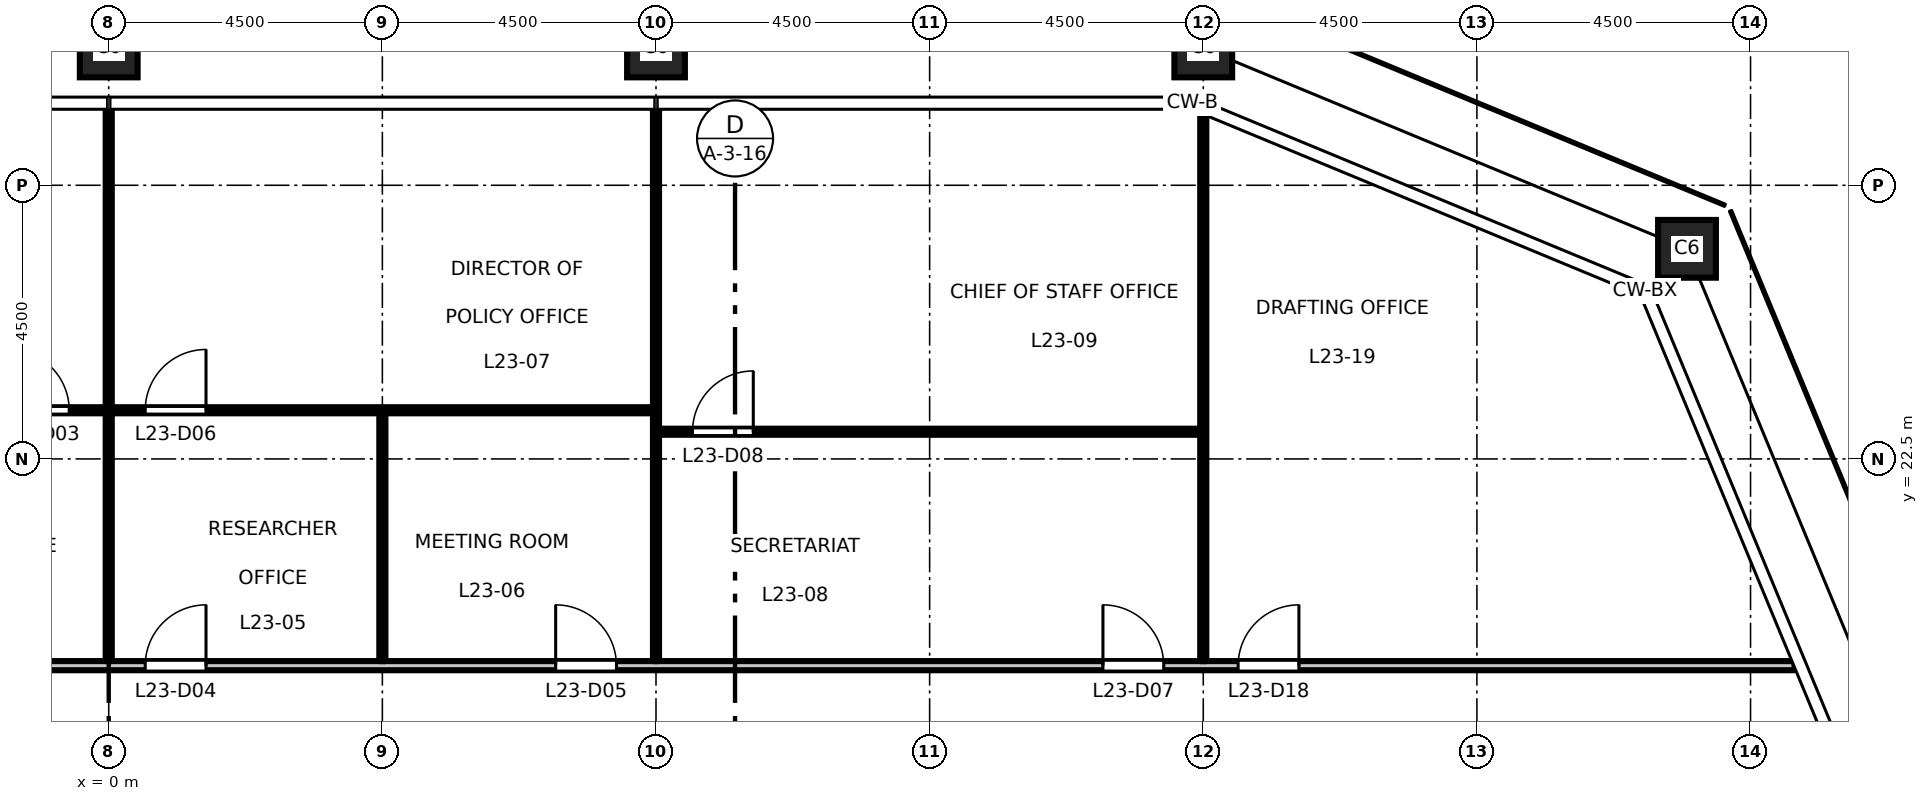
"""IFC4 building model, lengths in metres.
Left out: names, types, materials, properties, quantities, classifications, styles, units other than length and angle.
Written with IfcOpenShell. Run it as: python <this file> out.ifc"""

import sys

from ifc_helpers import new_model, si_unit, direction, frame, frame_2d, origin, origin_2d, place, context, subcontext, project, spatial, rectangle, hollow_rectangle, extrude, element, fill, save


model = new_model("IFC4")
c1 = context("Model", 3, precision=1e-05, world=origin(), true_north=direction((0.0, 1.0)))
c2 = subcontext(c1, "Body", "Model", "MODEL_VIEW")
j1 = project(units=[si_unit("LENGTHUNIT", "METRE"), si_unit("PLANEANGLEUNIT", "RADIAN")], contexts=[c1])
p1 = place(None, origin())
s1 = spatial("IfcSite", under=j1, at=p1, CompositionType="ELEMENT")
p2 = place(p1, origin())
s2 = spatial("IfcBuilding", under=s1, at=p2, CompositionType="ELEMENT")
p3 = place(p2, frame((0.0, 0.0, 109.2)))
s3 = spatial("IfcBuildingStorey", under=s2, at=p3, CompositionType="ELEMENT", Elevation=109.2)
for number, where, z_axis, x_axis in (
    (1, (25.955, 25.955, 0.0), (0.0, 0.0, 1.0), (1.0, 0.0, 0.0)),
    (2, (18.0, 29.25, 0.0), (0.0, 0.0, 1.0), (1.0, 0.0, 0.0)),
    (3, (9.0, 29.25, 0.0), (0.0, 0.0, 1.0), (1.0, 0.0, 0.0)),
    (4, (0.0, 29.25, 0.0), (0.0, 0.0, 1.0), (1.0, 0.0, 0.0)),
):
    element("IfcColumn", number, at=place(p3, frame(where, z_axis=z_axis, x_axis=x_axis)), inside=s3, PredefinedType="COLUMN", context=c2, shape_type="SweptSolid", body=[
        extrude(hollow_rectangle(XDim=0.95, YDim=0.95, WallThickness=0.055, at=origin_2d()), origin(), (0.0, 0.0, 1.0), 4.5),
    ])
p4 = place(p3, frame((-27.723, 19.1, 0.0), z_axis=(0.0, 0.0, 1.0), x_axis=(1.0, 0.0, 0.0)))
e5 = element("IfcWall", 5, at=p4, inside=s3, PredefinedType="PARTITIONING", context=c2, shape_type="SweptSolid", body=[
    extrude(rectangle(XDim=55.446, YDim=0.15, at=frame_2d((27.723, 0.0))), origin(), (0.0, 0.0, 1.0), 4.35),
])
p5 = place(p4, frame((17.073, 0.0, 0.0)))
e6 = element("IfcOpeningElement", 6, at=p5, cuts=e5, PredefinedType="OPENING", context=c2, shape_type="SweptSolid", body=[
    extrude(rectangle(XDim=1.0, YDim=2.1, at=frame_2d((0.5, 1.05))), frame((0.0, 0.085, 0.0), z_axis=(0.0, -1.0, 0.0), x_axis=(1.0, 0.0, 0.0)), (0.0, 0.0, 1.0), 0.17),
])
p6 = place(p4, frame((19.323, 0.0, 0.0)))
e7 = element("IfcOpeningElement", 7, at=p6, cuts=e5, PredefinedType="OPENING", context=c2, shape_type="SweptSolid", body=[
    extrude(rectangle(XDim=1.0, YDim=2.1, at=frame_2d((0.5, 1.05))), frame((0.0, 0.085, 0.0), z_axis=(0.0, -1.0, 0.0), x_axis=(1.0, 0.0, 0.0)), (0.0, 0.0, 1.0), 0.17),
])
p7 = place(p4, frame((28.323, 0.0, 0.0)))
e8 = element("IfcOpeningElement", 8, at=p7, cuts=e5, PredefinedType="OPENING", context=c2, shape_type="SweptSolid", body=[
    extrude(rectangle(XDim=1.0, YDim=2.1, at=frame_2d((0.5, 1.05))), frame((0.0, 0.085, 0.0), z_axis=(0.0, -1.0, 0.0), x_axis=(1.0, 0.0, 0.0)), (0.0, 0.0, 1.0), 0.17),
])
p8 = place(p4, frame((35.073, 0.0, 0.0)))
e9 = element("IfcOpeningElement", 9, at=p8, cuts=e5, PredefinedType="OPENING", context=c2, shape_type="SweptSolid", body=[
    extrude(rectangle(XDim=1.0, YDim=2.1, at=frame_2d((0.5, 1.05))), frame((0.0, 0.085, 0.0), z_axis=(0.0, -1.0, 0.0), x_axis=(1.0, 0.0, 0.0)), (0.0, 0.0, 1.0), 0.17),
])
p9 = place(p4, frame((44.073, 0.0, 0.0)))
e10 = element("IfcOpeningElement", 10, at=p9, cuts=e5, PredefinedType="OPENING", context=c2, shape_type="SweptSolid", body=[
    extrude(rectangle(XDim=1.0, YDim=2.1, at=frame_2d((0.5, 1.05))), frame((0.0, 0.085, 0.0), z_axis=(0.0, -1.0, 0.0), x_axis=(1.0, 0.0, 0.0)), (0.0, 0.0, 1.0), 0.17),
])
p10 = place(p4, frame((0.573, 0.0, 0.0)))
e11 = element("IfcOpeningElement", 11, at=p10, cuts=e5, PredefinedType="OPENING", context=c2, shape_type="SweptSolid", body=[
    extrude(rectangle(XDim=1.0, YDim=2.1, at=frame_2d((0.5, 1.05))), frame((0.0, 0.085, 0.0), z_axis=(0.0, -1.0, 0.0), x_axis=(1.0, 0.0, 0.0)), (0.0, 0.0, 1.0), 0.17),
])
p11 = place(p4, frame((46.296, 0.0, 0.0)))
e12 = element("IfcOpeningElement", 12, at=p11, cuts=e5, PredefinedType="OPENING", context=c2, shape_type="SweptSolid", body=[
    extrude(rectangle(XDim=1.0, YDim=2.1, at=frame_2d((0.5, 1.05))), frame((0.0, 0.085, 0.0), z_axis=(0.0, -1.0, 0.0), x_axis=(1.0, 0.0, 0.0)), (0.0, 0.0, 1.0), 0.17),
])
p12 = place(p3, frame((9.05, 22.947, 0.0), z_axis=(0.0, 0.0, 1.0), x_axis=(1.0, 0.0, 0.0)))
e13 = element("IfcWall", 13, at=p12, inside=s3, PredefinedType="PARTITIONING", context=c2, shape_type="SweptSolid", body=[
    extrude(rectangle(XDim=8.9, YDim=0.1, at=frame_2d((4.45, 0.0))), origin(), (0.0, 0.0, 1.0), 4.35),
])
p13 = place(p12, frame((0.55, 0.0, 0.0)))
e14 = element("IfcOpeningElement", 14, at=p13, cuts=e13, PredefinedType="OPENING", context=c2, shape_type="SweptSolid", body=[
    extrude(rectangle(XDim=1.0, YDim=2.1, at=frame_2d((0.5, 1.05))), frame((0.0, 0.06, 0.0), z_axis=(0.0, -1.0, 0.0), x_axis=(1.0, 0.0, 0.0)), (0.0, 0.0, 1.0), 0.12),
])
p14 = place(p3, frame((-8.95, 23.3, 0.0), z_axis=(0.0, 0.0, 1.0), x_axis=(1.0, 0.0, 0.0)))
e15 = element("IfcWall", 15, at=p14, inside=s3, PredefinedType="PARTITIONING", context=c2, shape_type="SweptSolid", body=[
    extrude(rectangle(XDim=17.9, YDim=0.1, at=frame_2d((8.95, 0.0))), origin(), (0.0, 0.0, 1.0), 4.35),
])
p15 = place(p14, frame((7.3, 0.0, 0.0)))
e16 = element("IfcOpeningElement", 16, at=p15, cuts=e15, PredefinedType="OPENING", context=c2, shape_type="SweptSolid", body=[
    extrude(rectangle(XDim=1.0, YDim=2.1, at=frame_2d((0.5, 1.05))), frame((0.0, 0.06, 0.0), z_axis=(0.0, -1.0, 0.0), x_axis=(1.0, 0.0, 0.0)), (0.0, 0.0, 1.0), 0.12),
])
p16 = place(p14, frame((9.55, 0.0, 0.0)))
e17 = element("IfcOpeningElement", 17, at=p16, cuts=e15, PredefinedType="OPENING", context=c2, shape_type="SweptSolid", body=[
    extrude(rectangle(XDim=1.0, YDim=2.1, at=frame_2d((0.5, 1.05))), frame((0.0, 0.06, 0.0), z_axis=(0.0, -1.0, 0.0), x_axis=(1.0, 0.0, 0.0)), (0.0, 0.0, 1.0), 0.12),
])
p17 = place(p3, frame((0.0, 19.175, 0.0), z_axis=(0.0, 0.0, 1.0), x_axis=(0.0, 1.0, 0.0)))
e18 = element("IfcWall", 18, at=p17, inside=s3, PredefinedType="PARTITIONING", context=c2, shape_type="SweptSolid", body=[
    extrude(rectangle(XDim=4.075, YDim=0.1, at=frame_2d((2.038, 0.0))), origin(), (0.0, 0.0, 1.0), 3.45),
])
p18 = place(p3, frame((0.0, 23.35, 0.0), z_axis=(0.0, 0.0, 1.0), x_axis=(0.0, 1.0, 0.0)))
e19 = element("IfcWall", 19, at=p18, inside=s3, PredefinedType="PARTITIONING", context=c2, shape_type="SweptSolid", body=[
    extrude(rectangle(XDim=4.91, YDim=0.1, at=frame_2d((2.455, 0.0))), origin(), (0.0, 0.0, 1.0), 3.45),
])
p19 = place(p3, frame((4.5, 19.175, 0.0), z_axis=(0.0, 0.0, 1.0), x_axis=(0.0, 1.0, 0.0)))
e20 = element("IfcWall", 20, at=p19, inside=s3, PredefinedType="PARTITIONING", context=c2, shape_type="SweptSolid", body=[
    extrude(rectangle(XDim=4.075, YDim=0.1, at=frame_2d((2.038, 0.0))), origin(), (0.0, 0.0, 1.0), 4.35),
])
p20 = place(p3, frame((9.0, 19.175, 0.0), z_axis=(0.0, 0.0, 1.0), x_axis=(0.0, 1.0, 0.0)))
e21 = element("IfcWall", 21, at=p20, inside=s3, PredefinedType="PARTITIONING", context=c2, shape_type="SweptSolid", body=[
    extrude(rectangle(XDim=9.085, YDim=0.1, at=frame_2d((4.542, 0.0))), origin(), (0.0, 0.0, 1.0), 3.45),
])
p21 = place(p3, frame((18.0, 19.175, 0.0), z_axis=(0.0, 0.0, 1.0), x_axis=(0.0, 1.0, 0.0)))
e22 = element("IfcWall", 22, at=p21, inside=s3, PredefinedType="PARTITIONING", context=c2, shape_type="SweptSolid", body=[
    extrude(rectangle(XDim=9.003, YDim=0.1, at=frame_2d((4.501, 0.0))), origin(), (0.0, 0.0, 1.0), 3.45),
])
p22 = place(p15, origin())
e23 = element("IfcDoor", 23, at=p22, inside=s3, OperationType="SINGLE_SWING_LEFT", PredefinedType="DOOR", context=c2, shape_type="SweptSolid", body=[
    extrude(rectangle(XDim=1.0, YDim=2.1, at=frame_2d((0.5, 1.05))), frame((0.0, 0.025, 0.0), z_axis=(0.0, -1.0, 0.0), x_axis=(1.0, 0.0, 0.0)), (0.0, 0.0, 1.0), 0.05),
])
fill(e16, e23)
p23 = place(p7, origin())
e24 = element("IfcDoor", 24, at=p23, inside=s3, OperationType="SINGLE_SWING_RIGHT", PredefinedType="DOOR", context=c2, shape_type="SweptSolid", body=[
    extrude(rectangle(XDim=1.0, YDim=2.1, at=frame_2d((0.5, 1.05))), frame((0.0, 0.025, 0.0), z_axis=(0.0, -1.0, 0.0), x_axis=(1.0, 0.0, 0.0)), (0.0, 0.0, 1.0), 0.05),
])
fill(e8, e24)
p24 = place(p8, origin())
e25 = element("IfcDoor", 25, at=p24, inside=s3, OperationType="SINGLE_SWING_LEFT", PredefinedType="DOOR", context=c2, shape_type="SweptSolid", body=[
    extrude(rectangle(XDim=1.0, YDim=2.1, at=frame_2d((0.5, 1.05))), frame((0.0, 0.025, 0.0), z_axis=(0.0, -1.0, 0.0), x_axis=(1.0, 0.0, 0.0)), (0.0, 0.0, 1.0), 0.05),
])
fill(e9, e25)
p25 = place(p16, origin())
e26 = element("IfcDoor", 26, at=p25, inside=s3, OperationType="SINGLE_SWING_RIGHT", PredefinedType="DOOR", context=c2, shape_type="SweptSolid", body=[
    extrude(rectangle(XDim=1.0, YDim=2.1, at=frame_2d((0.5, 1.05))), frame((0.0, 0.025, 0.0), z_axis=(0.0, -1.0, 0.0), x_axis=(1.0, 0.0, 0.0)), (0.0, 0.0, 1.0), 0.05),
])
fill(e17, e26)
p26 = place(p9, origin())
e27 = element("IfcDoor", 27, at=p26, inside=s3, OperationType="SINGLE_SWING_LEFT", PredefinedType="DOOR", context=c2, shape_type="SweptSolid", body=[
    extrude(rectangle(XDim=1.0, YDim=2.1, at=frame_2d((0.5, 1.05))), frame((0.0, 0.025, 0.0), z_axis=(0.0, -1.0, 0.0), x_axis=(1.0, 0.0, 0.0)), (0.0, 0.0, 1.0), 0.05),
])
fill(e10, e27)
p27 = place(p13, origin())
e28 = element("IfcDoor", 28, at=p27, inside=s3, OperationType="SINGLE_SWING_RIGHT", PredefinedType="DOOR", context=c2, shape_type="SweptSolid", body=[
    extrude(rectangle(XDim=1.0, YDim=2.1, at=frame_2d((0.5, 1.05))), frame((0.0, 0.025, 0.0), z_axis=(0.0, -1.0, 0.0), x_axis=(1.0, 0.0, 0.0)), (0.0, 0.0, 1.0), 0.05),
])
fill(e14, e28)
p28 = place(p11, origin())
e29 = element("IfcDoor", 29, at=p28, inside=s3, OperationType="SINGLE_SWING_RIGHT", PredefinedType="DOOR", context=c2, shape_type="SweptSolid", body=[
    extrude(rectangle(XDim=1.0, YDim=2.1, at=frame_2d((0.5, 1.05))), frame((0.0, 0.025, 0.0), z_axis=(0.0, -1.0, 0.0), x_axis=(1.0, 0.0, 0.0)), (0.0, 0.0, 1.0), 0.05),
])
fill(e12, e29)
save(model, sys.argv[1])
